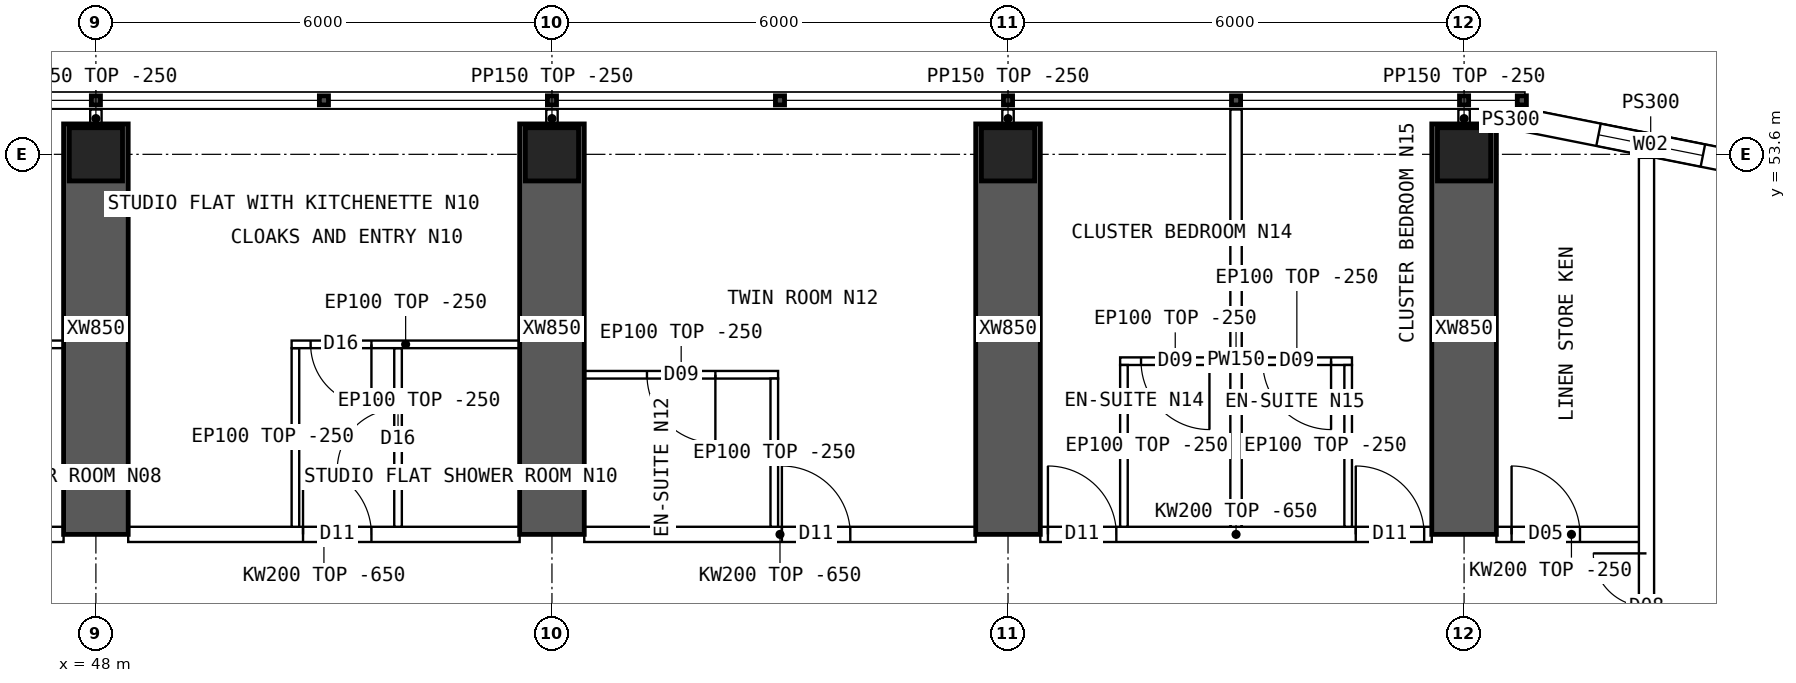
"""IFC4 building model, lengths in metres.
Left out: names, types, materials, properties, quantities, classifications, styles, units other than length and angle.
Written with IfcOpenShell. Run it as: python <this file> out.ifc"""

import sys

from ifc_helpers import new_model, si_unit, direction, frame, frame_2d, origin, origin_2d, place, context, subcontext, project, spatial, polyline, rectangle, hollow_rectangle, outline, extrude, element, fill, save


model = new_model("IFC4")
c1 = context("Model", 3, precision=1e-05, world=origin(), true_north=direction((0.0, 1.0)))
c2 = subcontext(c1, "Body", "Model", "MODEL_VIEW")
j1 = project(units=[si_unit("LENGTHUNIT", "METRE"), si_unit("PLANEANGLEUNIT", "RADIAN")], contexts=[c1])
p1 = place(None, origin())
s1 = spatial("IfcSite", under=j1, at=p1, CompositionType="ELEMENT")
p2 = place(p1, origin())
s2 = spatial("IfcBuilding", under=s1, at=p2, CompositionType="ELEMENT")
p3 = place(p2, frame((0.0, 0.0, 156.1)))
s3 = spatial("IfcBuildingStorey", under=s2, at=p3, CompositionType="ELEMENT", Elevation=156.1)
for number, where, z_axis, x_axis in (
    (1, (48.0, 53.6, 0.0), (0.0, 0.0, 1.0), (1.0, 0.0, 0.0)),
    (2, (54.0, 53.6, 0.0), (0.0, 0.0, 1.0), (1.0, 0.0, 0.0)),
    (3, (60.0, 53.6, 0.0), (0.0, 0.0, 1.0), (1.0, 0.0, 0.0)),
    (4, (66.0, 53.6, 0.0), (0.0, 0.0, 1.0), (1.0, 0.0, 0.0)),
):
    element("IfcColumn", number, at=place(p3, frame(where, z_axis=z_axis, x_axis=x_axis)), inside=s3, PredefinedType="COLUMN", context=c2, shape_type="SweptSolid", body=[
        extrude(hollow_rectangle(XDim=0.7, YDim=0.7, WallThickness=0.07, at=origin_2d()), origin(), (0.0, 0.0, 1.0), 3.75),
    ])
for number, where, z_axis, x_axis in (
    (5, (48.0, 48.6, 0.0), (0.0, 0.0, 1.0), (0.0, 1.0, 0.0)),
    (6, (54.0, 48.6, 0.0), (0.0, 0.0, 1.0), (0.0, 1.0, 0.0)),
    (7, (60.0, 48.6, 0.0), (0.0, 0.0, 1.0), (0.0, 1.0, 0.0)),
    (8, (66.0, 48.6, 0.0), (0.0, 0.0, 1.0), (0.0, 1.0, 0.0)),
):
    element("IfcWall", number, at=place(p3, frame(where, z_axis=z_axis, x_axis=x_axis)), inside=s3, PredefinedType="SHEAR", context=c2, shape_type="SweptSolid", body=[
        extrude(rectangle(XDim=5.4, YDim=0.85, at=frame_2d((2.7, 0.0))), origin(), (0.0, 0.0, 1.0), 3.75),
    ])
p4 = place(p3, frame((70.11, 53.392, 0.0), z_axis=(0.0, 0.0, 1.0), x_axis=(-0.98078325777, 0.195100490205, 0.0)))
e9 = element("IfcWall", 9, at=p4, inside=s3, PredefinedType="SOLIDWALL", context=c2, shape_type="SweptSolid", body=[
    extrude(outline(polyline([(-0.03, -0.15), (3.405, -0.15), (3.345, 0.15), (0.03, 0.15), (-0.03, -0.15)])), origin(), (0.0, 0.0, 1.0), 3.5),
])
p5 = place(p4, frame((0.988, 0.0, 0.9)))
e10 = element("IfcOpeningElement", 10, at=p5, cuts=e9, PredefinedType="OPENING", context=c2, shape_type="SweptSolid", body=[
    extrude(rectangle(XDim=1.4, YDim=1.8, at=frame_2d((0.7, 0.9))), frame((0.0, 0.16, 0.0), z_axis=(0.0, -1.0, 0.0), x_axis=(1.0, 0.0, 0.0)), (0.0, 0.0, 1.0), 0.32),
])
p6 = place(p3, frame((66.8, 54.05, 0.0), z_axis=(0.0, 0.0, 1.0), x_axis=(-1.0, 0.0, 0.0)))
e11 = element("IfcWall", 11, at=p6, inside=s3, PredefinedType="SOLIDWALL", context=c2, shape_type="SweptSolid", body=[
    extrude(rectangle(XDim=0.375, YDim=0.3, at=frame_2d((0.188, 0.0))), origin(), (0.0, 0.0, 1.0), 3.5),
])
p7 = place(p3, frame((42.425, 48.6, 0.0), z_axis=(0.0, 0.0, 1.0), x_axis=(1.0, 0.0, 0.0)))
e12 = element("IfcWall", 12, at=p7, inside=s3, PredefinedType="SOLIDWALL", context=c2, shape_type="SweptSolid", body=[
    extrude(outline(polyline([(0.0, 0.0), (5.15, 0.0), (5.15, 3.1), (0.0, 3.1), (0.0, 0.0)])), frame((0.0, 0.1, 0.0), z_axis=(0.0, -1.0, 0.0), x_axis=(1.0, 0.0, 0.0)), (0.0, 0.0, 1.0), 0.2),
])
p8 = place(p7, frame((2.3, 0.0, 0.0)))
e13 = element("IfcOpeningElement", 13, at=p8, cuts=e12, PredefinedType="OPENING", context=c2, shape_type="SweptSolid", body=[
    extrude(rectangle(XDim=0.9, YDim=2.1, at=frame_2d((0.45, 1.05))), frame((0.0, 0.11, 0.0), z_axis=(0.0, -1.0, 0.0), x_axis=(1.0, 0.0, 0.0)), (0.0, 0.0, 1.0), 0.22),
])
p9 = place(p3, frame((48.425, 48.6, 0.0), z_axis=(0.0, 0.0, 1.0), x_axis=(1.0, 0.0, 0.0)))
e14 = element("IfcWall", 14, at=p9, inside=s3, PredefinedType="SOLIDWALL", context=c2, shape_type="SweptSolid", body=[
    extrude(outline(polyline([(0.0, 0.0), (5.15, 0.0), (5.15, 3.1), (0.0, 3.1), (0.0, 0.0)])), frame((0.0, 0.1, 0.0), z_axis=(0.0, -1.0, 0.0), x_axis=(1.0, 0.0, 0.0)), (0.0, 0.0, 1.0), 0.2),
])
p10 = place(p9, frame((2.3, 0.0, 0.0)))
e15 = element("IfcOpeningElement", 15, at=p10, cuts=e14, PredefinedType="OPENING", context=c2, shape_type="SweptSolid", body=[
    extrude(rectangle(XDim=0.9, YDim=2.1, at=frame_2d((0.45, 1.05))), frame((0.0, 0.11, 0.0), z_axis=(0.0, -1.0, 0.0), x_axis=(1.0, 0.0, 0.0)), (0.0, 0.0, 1.0), 0.22),
])
p11 = place(p3, frame((54.425, 48.6, 0.0), z_axis=(0.0, 0.0, 1.0), x_axis=(1.0, 0.0, 0.0)))
e16 = element("IfcWall", 16, at=p11, inside=s3, PredefinedType="SOLIDWALL", context=c2, shape_type="SweptSolid", body=[
    extrude(outline(polyline([(0.0, 0.0), (5.15, 0.0), (5.15, 3.1), (0.0, 3.1), (0.0, 0.0)])), frame((0.0, 0.1, 0.0), z_axis=(0.0, -1.0, 0.0), x_axis=(1.0, 0.0, 0.0)), (0.0, 0.0, 1.0), 0.2),
])
p12 = place(p11, frame((2.6, 0.0, 0.0)))
e17 = element("IfcOpeningElement", 17, at=p12, cuts=e16, PredefinedType="OPENING", context=c2, shape_type="SweptSolid", body=[
    extrude(rectangle(XDim=0.9, YDim=2.1, at=frame_2d((0.45, 1.05))), frame((0.0, 0.11, 0.0), z_axis=(0.0, -1.0, 0.0), x_axis=(1.0, 0.0, 0.0)), (0.0, 0.0, 1.0), 0.22),
])
p13 = place(p3, frame((60.425, 48.6, 0.0), z_axis=(0.0, 0.0, 1.0), x_axis=(1.0, 0.0, 0.0)))
e18 = element("IfcWall", 18, at=p13, inside=s3, PredefinedType="SOLIDWALL", context=c2, shape_type="SweptSolid", body=[
    extrude(outline(polyline([(0.0, 0.0), (5.15, 0.0), (5.15, 3.1), (0.0, 3.1), (0.0, 0.0)])), frame((0.0, 0.1, 0.0), z_axis=(0.0, -1.0, 0.0), x_axis=(1.0, 0.0, 0.0)), (0.0, 0.0, 1.0), 0.2),
])
p14 = place(p13, frame((0.1, 0.0, 0.0)))
e19 = element("IfcOpeningElement", 19, at=p14, cuts=e18, PredefinedType="OPENING", context=c2, shape_type="SweptSolid", body=[
    extrude(rectangle(XDim=0.9, YDim=2.1, at=frame_2d((0.45, 1.05))), frame((0.0, 0.11, 0.0), z_axis=(0.0, -1.0, 0.0), x_axis=(1.0, 0.0, 0.0)), (0.0, 0.0, 1.0), 0.22),
])
p15 = place(p13, frame((4.15, 0.0, 0.0)))
e20 = element("IfcOpeningElement", 20, at=p15, cuts=e18, PredefinedType="OPENING", context=c2, shape_type="SweptSolid", body=[
    extrude(rectangle(XDim=0.9, YDim=2.1, at=frame_2d((0.45, 1.05))), frame((0.0, 0.11, 0.0), z_axis=(0.0, -1.0, 0.0), x_axis=(1.0, 0.0, 0.0)), (0.0, 0.0, 1.0), 0.22),
])
p16 = place(p3, frame((66.425, 48.6, 0.0), z_axis=(0.0, 0.0, 1.0), x_axis=(1.0, 0.0, 0.0)))
e21 = element("IfcWall", 21, at=p16, inside=s3, PredefinedType="SOLIDWALL", context=c2, shape_type="SweptSolid", body=[
    extrude(rectangle(XDim=1.975, YDim=0.2, at=frame_2d((0.987, 0.0))), origin(), (0.0, 0.0, 1.0), 3.5),
])
p17 = place(p16, frame((0.2, 0.0, 0.0)))
e22 = element("IfcOpeningElement", 22, at=p17, cuts=e21, PredefinedType="OPENING", context=c2, shape_type="SweptSolid", body=[
    extrude(rectangle(XDim=0.9, YDim=2.1, at=frame_2d((0.45, 1.05))), frame((0.0, 0.11, 0.0), z_axis=(0.0, -1.0, 0.0), x_axis=(1.0, 0.0, 0.0)), (0.0, 0.0, 1.0), 0.22),
])
p18 = place(p3, frame((44.575, 51.1, 0.0), z_axis=(0.0, 0.0, 1.0), x_axis=(1.0, 0.0, 0.0)))
e23 = element("IfcWall", 23, at=p18, inside=s3, PredefinedType="PARTITIONING", context=c2, shape_type="SweptSolid", body=[
    extrude(rectangle(XDim=3.0, YDim=0.1, at=frame_2d((1.5, 0.0))), origin(), (0.0, 0.0, 1.0), 3.5),
])
p19 = place(p18, frame((0.25, 0.0, 0.0)))
e24 = element("IfcOpeningElement", 24, at=p19, cuts=e23, PredefinedType="OPENING", context=c2, shape_type="SweptSolid", body=[
    extrude(rectangle(XDim=0.8, YDim=2.1, at=frame_2d((0.4, 1.05))), frame((0.0, 0.06, 0.0), z_axis=(0.0, -1.0, 0.0), x_axis=(1.0, 0.0, 0.0)), (0.0, 0.0, 1.0), 0.12),
])
p20 = place(p3, frame((50.575, 51.1, 0.0), z_axis=(0.0, 0.0, 1.0), x_axis=(1.0, 0.0, 0.0)))
e25 = element("IfcWall", 25, at=p20, inside=s3, PredefinedType="PARTITIONING", context=c2, shape_type="SweptSolid", body=[
    extrude(rectangle(XDim=3.0, YDim=0.1, at=frame_2d((1.5, 0.0))), origin(), (0.0, 0.0, 1.0), 3.5),
])
p21 = place(p20, frame((0.25, 0.0, 0.0)))
e26 = element("IfcOpeningElement", 26, at=p21, cuts=e25, PredefinedType="OPENING", context=c2, shape_type="SweptSolid", body=[
    extrude(rectangle(XDim=0.8, YDim=2.1, at=frame_2d((0.4, 1.05))), frame((0.0, 0.06, 0.0), z_axis=(0.0, -1.0, 0.0), x_axis=(1.0, 0.0, 0.0)), (0.0, 0.0, 1.0), 0.12),
])
p22 = place(p3, frame((50.625, 51.05, 0.0), z_axis=(0.0, 0.0, 1.0), x_axis=(0.0, -1.0, 0.0)))
e27 = element("IfcWall", 27, at=p22, inside=s3, PredefinedType="PARTITIONING", context=c2, shape_type="SweptSolid", body=[
    extrude(outline(polyline([(0.0, 0.0), (2.35, 0.0), (2.35, 3.1), (2.302, 3.1), (2.3, 3.5), (0.0, 3.5), (0.0, 0.0)])), frame((0.0, 0.05, 0.0), z_axis=(0.0, -1.0, 0.0), x_axis=(1.0, 0.0, 0.0)), (0.0, 0.0, 1.0), 0.1),
])
p23 = place(p3, frame((51.975, 51.05, 0.0), z_axis=(0.0, 0.0, 1.0), x_axis=(0.0, -1.0, 0.0)))
e28 = element("IfcWall", 28, at=p23, inside=s3, PredefinedType="PARTITIONING", context=c2, shape_type="SweptSolid", body=[
    extrude(outline(polyline([(0.0, 0.0), (2.35, 0.0), (2.35, 3.1), (2.302, 3.1), (2.3, 3.5), (0.0, 3.5), (0.0, 0.0)])), frame((0.0, 0.05, 0.0), z_axis=(0.0, -1.0, 0.0), x_axis=(1.0, 0.0, 0.0)), (0.0, 0.0, 1.0), 0.1),
])
p24 = place(p23, frame((0.8, 0.0, 0.0)))
e29 = element("IfcOpeningElement", 29, at=p24, cuts=e28, PredefinedType="OPENING", context=c2, shape_type="SweptSolid", body=[
    extrude(rectangle(XDim=0.8, YDim=2.1, at=frame_2d((0.4, 1.05))), frame((0.0, 0.06, 0.0), z_axis=(0.0, -1.0, 0.0), x_axis=(1.0, 0.0, 0.0)), (0.0, 0.0, 1.0), 0.12),
])
p25 = place(p3, frame((54.425, 50.7, 0.0), z_axis=(0.0, 0.0, 1.0), x_axis=(1.0, 0.0, 0.0)))
e30 = element("IfcWall", 30, at=p25, inside=s3, PredefinedType="PARTITIONING", context=c2, shape_type="SweptSolid", body=[
    extrude(rectangle(XDim=2.55, YDim=0.1, at=frame_2d((1.275, 0.0))), origin(), (0.0, 0.0, 1.0), 3.5),
])
p26 = place(p25, frame((0.825, 0.0, 0.0)))
e31 = element("IfcOpeningElement", 31, at=p26, cuts=e30, PredefinedType="OPENING", context=c2, shape_type="SweptSolid", body=[
    extrude(rectangle(XDim=0.9, YDim=2.1, at=frame_2d((0.45, 1.05))), frame((0.0, 0.06, 0.0), z_axis=(0.0, -1.0, 0.0), x_axis=(1.0, 0.0, 0.0)), (0.0, 0.0, 1.0), 0.12),
])
p27 = place(p3, frame((56.925, 50.65, 0.0), z_axis=(0.0, 0.0, 1.0), x_axis=(0.0, -1.0, 0.0)))
e32 = element("IfcWall", 32, at=p27, inside=s3, PredefinedType="PARTITIONING", context=c2, shape_type="SweptSolid", body=[
    extrude(outline(polyline([(0.0, 0.0), (1.95, 0.0), (1.95, 3.1), (1.902, 3.1), (1.9, 3.5), (0.0, 3.5), (0.0, 0.0)])), frame((0.0, 0.05, 0.0), z_axis=(0.0, -1.0, 0.0), x_axis=(1.0, 0.0, 0.0)), (0.0, 0.0, 1.0), 0.1),
])
p28 = place(p3, frame((63.0, 54.19, 0.0), z_axis=(0.0, 0.0, 1.0), x_axis=(0.0, -1.0, 0.0)))
e33 = element("IfcWall", 33, at=p28, inside=s3, PredefinedType="PARTITIONING", context=c2, shape_type="SweptSolid", body=[
    extrude(outline(polyline([(0.0, 0.0), (5.49, 0.0), (5.49, 3.1), (5.442, 3.1), (5.44, 3.5), (0.792, 3.5), (0.79, 3.1), (0.392, 3.1), (0.39, 3.5), (0.0, 3.5), (0.0, 0.0)])), frame((0.0, 0.075, 0.0), z_axis=(0.0, -1.0, 0.0), x_axis=(1.0, 0.0, 0.0)), (0.0, 0.0, 1.0), 0.15),
])
p29 = place(p3, frame((61.475, 50.879, 0.0), z_axis=(0.0, 0.0, 1.0), x_axis=(1.0, 0.0, 0.0)))
e34 = element("IfcWall", 34, at=p29, inside=s3, PredefinedType="PARTITIONING", context=c2, shape_type="SweptSolid", body=[
    extrude(rectangle(XDim=1.45, YDim=0.1, at=frame_2d((0.725, 0.0))), origin(), (0.0, 0.0, 1.0), 3.5),
])
p30 = place(p29, frame((0.275, 0.0, 0.0)))
e35 = element("IfcOpeningElement", 35, at=p30, cuts=e34, PredefinedType="OPENING", context=c2, shape_type="SweptSolid", body=[
    extrude(rectangle(XDim=0.9, YDim=2.1, at=frame_2d((0.45, 1.05))), frame((0.0, 0.06, 0.0), z_axis=(0.0, -1.0, 0.0), x_axis=(1.0, 0.0, 0.0)), (0.0, 0.0, 1.0), 0.12),
])
p31 = place(p3, frame((61.525, 50.829, 0.0), z_axis=(0.0, 0.0, 1.0), x_axis=(0.0, -1.0, 0.0)))
e36 = element("IfcWall", 36, at=p31, inside=s3, PredefinedType="PARTITIONING", context=c2, shape_type="SweptSolid", body=[
    extrude(outline(polyline([(0.0, 0.0), (2.129, 0.0), (2.129, 3.1), (2.081, 3.1), (2.079, 3.5), (0.0, 3.5), (0.0, 0.0)])), frame((0.0, 0.05, 0.0), z_axis=(0.0, -1.0, 0.0), x_axis=(1.0, 0.0, 0.0)), (0.0, 0.0, 1.0), 0.1),
])
p32 = place(p3, frame((63.075, 50.879, 0.0), z_axis=(0.0, 0.0, 1.0), x_axis=(1.0, 0.0, 0.0)))
e37 = element("IfcWall", 37, at=p32, inside=s3, PredefinedType="PARTITIONING", context=c2, shape_type="SweptSolid", body=[
    extrude(rectangle(XDim=1.45, YDim=0.1, at=frame_2d((0.725, 0.0))), origin(), (0.0, 0.0, 1.0), 3.5),
])
p33 = place(p32, frame((0.275, 0.0, 0.0)))
e38 = element("IfcOpeningElement", 38, at=p33, cuts=e37, PredefinedType="OPENING", context=c2, shape_type="SweptSolid", body=[
    extrude(rectangle(XDim=0.9, YDim=2.1, at=frame_2d((0.45, 1.05))), frame((0.0, 0.06, 0.0), z_axis=(0.0, -1.0, 0.0), x_axis=(1.0, 0.0, 0.0)), (0.0, 0.0, 1.0), 0.12),
])
p34 = place(p3, frame((64.475, 50.829, 0.0), z_axis=(0.0, 0.0, 1.0), x_axis=(0.0, -1.0, 0.0)))
e39 = element("IfcWall", 39, at=p34, inside=s3, PredefinedType="PARTITIONING", context=c2, shape_type="SweptSolid", body=[
    extrude(outline(polyline([(0.0, 0.0), (2.129, 0.0), (2.129, 3.1), (2.081, 3.1), (2.079, 3.5), (0.0, 3.5), (0.0, 0.0)])), frame((0.0, 0.05, 0.0), z_axis=(0.0, -1.0, 0.0), x_axis=(1.0, 0.0, 0.0)), (0.0, 0.0, 1.0), 0.1),
])
p35 = place(p3, frame((68.4, 10.446, 0.0), z_axis=(0.0, 0.0, 1.0), x_axis=(0.0, 1.0, 0.0)))
e40 = element("IfcWall", 40, at=p35, inside=s3, PredefinedType="SOLIDWALL", context=c2, shape_type="SweptSolid", body=[
    extrude(rectangle(XDim=43.107, YDim=0.2, at=frame_2d((21.554, 0.0))), origin(), (0.0, 0.0, 1.0), 3.5),
])
p36 = place(p35, frame((13.914, 0.0, 0.0)))
e41 = element("IfcOpeningElement", 41, at=p36, cuts=e40, PredefinedType="OPENING", context=c2, shape_type="SweptSolid", body=[
    extrude(rectangle(XDim=1.2, YDim=2.1, at=frame_2d((0.6, 1.05))), frame((0.0, 0.11, 0.0), z_axis=(0.0, -1.0, 0.0), x_axis=(1.0, 0.0, 0.0)), (0.0, 0.0, 1.0), 0.22),
])
p37 = place(p35, frame((22.634, 0.0, 0.0)))
e42 = element("IfcOpeningElement", 42, at=p37, cuts=e40, PredefinedType="OPENING", context=c2, shape_type="SweptSolid", body=[
    extrude(rectangle(XDim=1.2, YDim=2.1, at=frame_2d((0.6, 1.05))), frame((0.0, 0.11, 0.0), z_axis=(0.0, -1.0, 0.0), x_axis=(1.0, 0.0, 0.0)), (0.0, 0.0, 1.0), 0.22),
])
p38 = place(p35, frame((5.104, 0.0, 0.0)))
e43 = element("IfcOpeningElement", 43, at=p38, cuts=e40, PredefinedType="OPENING", context=c2, shape_type="SweptSolid", body=[
    extrude(rectangle(XDim=1.4, YDim=2.1, at=frame_2d((0.7, 1.05))), frame((0.0, 0.11, 0.0), z_axis=(0.0, -1.0, 0.0), x_axis=(1.0, 0.0, 0.0)), (0.0, 0.0, 1.0), 0.22),
])
p39 = place(p35, frame((36.504, 0.0, 0.0)))
e44 = element("IfcOpeningElement", 44, at=p39, cuts=e40, PredefinedType="OPENING", context=c2, shape_type="SweptSolid", body=[
    extrude(rectangle(XDim=1.4, YDim=2.1, at=frame_2d((0.7, 1.05))), frame((0.0, 0.11, 0.0), z_axis=(0.0, -1.0, 0.0), x_axis=(1.0, 0.0, 0.0)), (0.0, 0.0, 1.0), 0.22),
])
for number, where, z_axis, x_axis in (
    (45, (48.0, 53.95, 0.0), (0.0, 0.0, 1.0), (0.0, 1.0, 0.0)),
    (46, (54.0, 53.95, 0.0), (0.0, 0.0, 1.0), (0.0, 1.0, 0.0)),
    (47, (60.0, 53.95, 0.0), (0.0, 0.0, 1.0), (0.0, 1.0, 0.0)),
    (48, (66.0, 53.95, 0.0), (0.0, 0.0, 1.0), (0.0, 1.0, 0.0)),
):
    element("IfcWall", number, at=place(p3, frame(where, z_axis=z_axis, x_axis=x_axis)), inside=s3, PredefinedType="PARTITIONING", context=c2, shape_type="SweptSolid", body=[
        extrude(rectangle(XDim=0.24, YDim=0.15, at=frame_2d((0.12, 0.0))), origin(), (0.0, 0.0, 1.0), 3.5),
    ])
p40 = place(p5, origin())
e49 = element("IfcWindow", 49, at=p40, inside=s3, PartitioningType="SINGLE_PANEL", PredefinedType="WINDOW", context=c2, shape_type="SweptSolid", body=[
    extrude(rectangle(XDim=1.4, YDim=1.8, at=frame_2d((0.7, 0.9))), frame((0.0, 0.03, 0.0), z_axis=(0.0, -1.0, 0.0), x_axis=(1.0, 0.0, 0.0)), (0.0, 0.0, 1.0), 0.06),
])
fill(e10, e49)
p41 = place(p21, origin())
e50 = element("IfcDoor", 50, at=p41, inside=s3, OperationType="SINGLE_SWING_RIGHT", PredefinedType="DOOR", context=c2, shape_type="SweptSolid", body=[
    extrude(rectangle(XDim=0.8, YDim=2.1, at=frame_2d((0.4, 1.05))), frame((0.0, 0.025, 0.0), z_axis=(0.0, -1.0, 0.0), x_axis=(1.0, 0.0, 0.0)), (0.0, 0.0, 1.0), 0.05),
])
fill(e26, e50)
p42 = place(p24, origin())
e51 = element("IfcDoor", 51, at=p42, inside=s3, OperationType="SINGLE_SWING_RIGHT", PredefinedType="DOOR", context=c2, shape_type="SweptSolid", body=[
    extrude(rectangle(XDim=0.8, YDim=2.1, at=frame_2d((0.4, 1.05))), frame((0.0, 0.025, 0.0), z_axis=(0.0, -1.0, 0.0), x_axis=(1.0, 0.0, 0.0)), (0.0, 0.0, 1.0), 0.05),
])
fill(e29, e51)
p43 = place(p10, origin())
e52 = element("IfcDoor", 52, at=p43, inside=s3, OperationType="SINGLE_SWING_LEFT", PredefinedType="DOOR", context=c2, shape_type="SweptSolid", body=[
    extrude(rectangle(XDim=0.9, YDim=2.1, at=frame_2d((0.45, 1.05))), frame((0.0, 0.025, 0.0), z_axis=(0.0, -1.0, 0.0), x_axis=(1.0, 0.0, 0.0)), (0.0, 0.0, 1.0), 0.05),
])
fill(e15, e52)
p44 = place(p26, origin())
e53 = element("IfcDoor", 53, at=p44, inside=s3, OperationType="SINGLE_SWING_RIGHT", PredefinedType="DOOR", context=c2, shape_type="SweptSolid", body=[
    extrude(rectangle(XDim=0.9, YDim=2.1, at=frame_2d((0.45, 1.05))), frame((0.0, 0.025, 0.0), z_axis=(0.0, -1.0, 0.0), x_axis=(1.0, 0.0, 0.0)), (0.0, 0.0, 1.0), 0.05),
])
fill(e31, e53)
p45 = place(p12, origin())
e54 = element("IfcDoor", 54, at=p45, inside=s3, OperationType="SINGLE_SWING_LEFT", PredefinedType="DOOR", context=c2, shape_type="SweptSolid", body=[
    extrude(rectangle(XDim=0.9, YDim=2.1, at=frame_2d((0.45, 1.05))), frame((0.0, 0.025, 0.0), z_axis=(0.0, -1.0, 0.0), x_axis=(1.0, 0.0, 0.0)), (0.0, 0.0, 1.0), 0.05),
])
fill(e17, e54)
p46 = place(p30, origin())
e55 = element("IfcDoor", 55, at=p46, inside=s3, OperationType="SINGLE_SWING_RIGHT", PredefinedType="DOOR", context=c2, shape_type="SweptSolid", body=[
    extrude(rectangle(XDim=0.9, YDim=2.1, at=frame_2d((0.45, 1.05))), frame((0.0, 0.025, 0.0), z_axis=(0.0, -1.0, 0.0), x_axis=(1.0, 0.0, 0.0)), (0.0, 0.0, 1.0), 0.05),
])
fill(e35, e55)
p47 = place(p14, origin())
e56 = element("IfcDoor", 56, at=p47, inside=s3, OperationType="SINGLE_SWING_LEFT", PredefinedType="DOOR", context=c2, shape_type="SweptSolid", body=[
    extrude(rectangle(XDim=0.9, YDim=2.1, at=frame_2d((0.45, 1.05))), frame((0.0, 0.025, 0.0), z_axis=(0.0, -1.0, 0.0), x_axis=(1.0, 0.0, 0.0)), (0.0, 0.0, 1.0), 0.05),
])
fill(e19, e56)
p48 = place(p33, origin())
e57 = element("IfcDoor", 57, at=p48, inside=s3, OperationType="SINGLE_SWING_RIGHT", PredefinedType="DOOR", context=c2, shape_type="SweptSolid", body=[
    extrude(rectangle(XDim=0.9, YDim=2.1, at=frame_2d((0.45, 1.05))), frame((0.0, 0.025, 0.0), z_axis=(0.0, -1.0, 0.0), x_axis=(1.0, 0.0, 0.0)), (0.0, 0.0, 1.0), 0.05),
])
fill(e38, e57)
p49 = place(p15, origin())
e58 = element("IfcDoor", 58, at=p49, inside=s3, OperationType="SINGLE_SWING_LEFT", PredefinedType="DOOR", context=c2, shape_type="SweptSolid", body=[
    extrude(rectangle(XDim=0.9, YDim=2.1, at=frame_2d((0.45, 1.05))), frame((0.0, 0.025, 0.0), z_axis=(0.0, -1.0, 0.0), x_axis=(1.0, 0.0, 0.0)), (0.0, 0.0, 1.0), 0.05),
])
fill(e20, e58)
p50 = place(p39, origin())
e59 = element("IfcDoor", 59, at=p50, inside=s3, OperationType="DOUBLE_DOOR_SINGLE_SWING", PredefinedType="DOOR", context=c2, shape_type="SweptSolid", body=[
    extrude(rectangle(XDim=1.4, YDim=2.1, at=frame_2d((0.7, 1.05))), frame((0.0, 0.025, 0.0), z_axis=(0.0, -1.0, 0.0), x_axis=(1.0, 0.0, 0.0)), (0.0, 0.0, 1.0), 0.05),
])
fill(e44, e59)
p51 = place(p17, origin())
e60 = element("IfcDoor", 60, at=p51, inside=s3, OperationType="SINGLE_SWING_LEFT", PredefinedType="DOOR", context=c2, shape_type="SweptSolid", body=[
    extrude(rectangle(XDim=0.9, YDim=2.1, at=frame_2d((0.45, 1.05))), frame((0.0, 0.025, 0.0), z_axis=(0.0, -1.0, 0.0), x_axis=(1.0, 0.0, 0.0)), (0.0, 0.0, 1.0), 0.05),
])
fill(e22, e60)
save(model, sys.argv[1])
